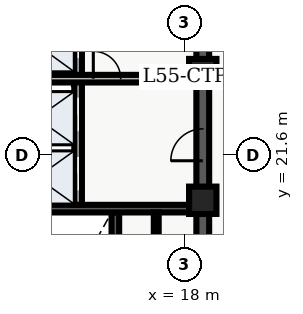
"""IFC4 building model, lengths in metres.
Left out: names, types, materials, properties, quantities, classifications, styles, units other than length and angle.
Written with IfcOpenShell. Run it as: python <this file> out.ifc"""

import sys

from ifc_helpers import new_model, entity, si_unit, converted_unit, direction, frame, origin_with_axes, origin_2d_with_axis, place, context, subcontext, project, spatial, polyline, rectangle, outline, extrude, element, fill, save


model = new_model("IFC4")
c1 = context("Model", 3, precision=1e-05, world=origin_with_axes(), true_north=direction((0.0, 1.0)))
c2 = subcontext(c1, "Body", "Model", "MODEL_VIEW")
j1 = project(units=[si_unit("LENGTHUNIT", "METRE"), converted_unit("PLANEANGLEUNIT", "DEGREE", entity("IfcPlaneAngleMeasure", 0.017), si_unit("PLANEANGLEUNIT", "RADIAN"), dimensions=[0, 0, 0, 0, 0, 0, 0])], contexts=[c1])
p1 = place(None, origin_with_axes())
s1 = spatial("IfcSite", under=j1, at=p1, CompositionType="ELEMENT")
p2 = place(p1, origin_with_axes())
s2 = spatial("IfcBuilding", under=s1, at=p2, CompositionType="ELEMENT")
p3 = place(p2, frame((0.0, 0.0, 224.7), z_axis=(0.0, 0.0, 1.0), x_axis=(1.0, 0.0, 0.0)))
s3 = spatial("IfcBuildingStorey", under=s2, at=p3, CompositionType="ELEMENT", Elevation=224.7)
p4 = place(p3, frame((18.6, 10.8, 0.0), z_axis=(0.0, 0.0, 1.0), x_axis=(0.0, 1.0, 0.0)))
e1 = element("IfcWall", 1, at=p4, inside=s3, PredefinedType="SHEAR", context=c2, shape_type="SweptSolid", body=[
    extrude(outline(polyline([(0.0, -0.21), (13.5, -0.21), (13.5, 0.21), (0.0, 0.21), (0.0, -0.21)])), origin_with_axes(), (0.0, 0.0, 1.0), 3.66),
])
p5 = place(p4, frame((1.3, 0.0, 0.0), z_axis=(0.0, 0.0, 1.0), x_axis=(1.0, 0.0, 0.0)))
e2 = element("IfcOpeningElement", 2, at=p5, cuts=e1, PredefinedType="OPENING", context=c2, shape_type="SweptSolid", body=[
    extrude(rectangle(XDim=1.1, YDim=0.44, at=origin_2d_with_axis()), origin_with_axes(), (0.0, 0.0, 1.0), 2.15),
])
p6 = place(p4, frame((3.4, 0.0, 0.0), z_axis=(0.0, 0.0, 1.0), x_axis=(1.0, 0.0, 0.0)))
e3 = element("IfcOpeningElement", 3, at=p6, cuts=e1, PredefinedType="OPENING", context=c2, shape_type="SweptSolid", body=[
    extrude(rectangle(XDim=1.1, YDim=0.44, at=origin_2d_with_axis()), origin_with_axes(), (0.0, 0.0, 1.0), 2.15),
])
p7 = place(p4, frame((11.125, 0.0, 0.0), z_axis=(0.0, 0.0, 1.0), x_axis=(1.0, 0.0, 0.0)))
e4 = element("IfcOpeningElement", 4, at=p7, cuts=e1, PredefinedType="OPENING", context=c2, shape_type="SweptSolid", body=[
    extrude(rectangle(XDim=1.05, YDim=0.44, at=origin_2d_with_axis()), origin_with_axes(), (0.0, 0.0, 1.0), 2.15),
])
p8 = place(p4, frame((6.675, 0.0, 0.0), z_axis=(0.0, 0.0, 1.0), x_axis=(1.0, 0.0, 0.0)))
e5 = element("IfcOpeningElement", 5, at=p8, cuts=e1, PredefinedType="OPENING", context=c2, shape_type="SweptSolid", body=[
    extrude(rectangle(XDim=0.95, YDim=0.44, at=origin_2d_with_axis()), origin_with_axes(), (0.0, 0.0, 1.0), 2.15),
])
p9 = place(p3, frame((18.6, 24.3, 0.0), z_axis=(0.0, 0.0, 1.0), x_axis=(0.0, 1.0, 0.0)))
e6 = element("IfcWall", 6, at=p9, inside=s3, PredefinedType="SHEAR", context=c2, shape_type="SweptSolid", body=[
    extrude(outline(polyline([(0.0, -0.21), (13.5, -0.21), (13.5, 0.21), (0.0, 0.21), (0.0, -0.21)])), origin_with_axes(), (0.0, 0.0, 1.0), 3.66),
])
p10 = place(p9, frame((6.725, 0.0, 0.0), z_axis=(0.0, 0.0, 1.0), x_axis=(1.0, 0.0, 0.0)))
e7 = element("IfcOpeningElement", 7, at=p10, cuts=e6, PredefinedType="OPENING", context=c2, shape_type="SweptSolid", body=[
    extrude(rectangle(XDim=1.05, YDim=0.44, at=origin_2d_with_axis()), origin_with_axes(), (0.0, 0.0, 1.0), 2.15),
])
p11 = place(p9, frame((11.125, 0.0, 0.0), z_axis=(0.0, 0.0, 1.0), x_axis=(1.0, 0.0, 0.0)))
e8 = element("IfcOpeningElement", 8, at=p11, cuts=e6, PredefinedType="OPENING", context=c2, shape_type="SweptSolid", body=[
    extrude(rectangle(XDim=1.05, YDim=0.44, at=origin_2d_with_axis()), origin_with_axes(), (0.0, 0.0, 1.0), 2.15),
])
p12 = place(p3, frame((15.725, 11.01, 0.0), z_axis=(0.0, 0.0, 1.0), x_axis=(0.0, 1.0, 0.0)))
e9 = element("IfcWall", 9, at=p12, inside=s3, PredefinedType="SHEAR", context=c2, shape_type="SweptSolid", body=[
    extrude(outline(polyline([(0.0, -0.125), (8.69, -0.125), (8.69, 0.125), (0.0, 0.125), (0.0, -0.125)])), origin_with_axes(), (0.0, 0.0, 1.0), 3.66),
])
p13 = place(p3, frame((11.61, 19.825, 0.0), z_axis=(0.0, 0.0, 1.0), x_axis=(1.0, 0.0, 0.0)))
e10 = element("IfcWall", 10, at=p13, inside=s3, PredefinedType="SHEAR", context=c2, shape_type="SweptSolid", body=[
    extrude(outline(polyline([(0.0, -0.125), (6.78, -0.125), (6.78, 0.125), (0.0, 0.125), (0.0, -0.125)])), origin_with_axes(), (0.0, 0.0, 1.0), 3.66),
])
p14 = place(p3, frame((14.5, 19.95, 0.0), z_axis=(0.0, 0.0, 1.0), x_axis=(0.0, 1.0, 0.0)))
e11 = element("IfcWall", 11, at=p14, inside=s3, PredefinedType="SOLIDWALL", context=c2, shape_type="SweptSolid", body=[
    extrude(outline(polyline([(0.0, -0.125), (6.25, -0.125), (6.25, 0.125), (0.0, 0.125), (0.0, -0.125)])), origin_with_axes(), (0.0, 0.0, 1.0), 2.7),
])
p15 = place(p14, frame((1.025, 0.0, 0.0), z_axis=(0.0, 0.0, 1.0), x_axis=(1.0, 0.0, 0.0)))
e12 = element("IfcOpeningElement", 12, at=p15, cuts=e11, PredefinedType="OPENING", context=c2, shape_type="SweptSolid", body=[
    extrude(rectangle(XDim=1.1, YDim=0.27, at=origin_2d_with_axis()), origin_with_axes(), (0.0, 0.0, 1.0), 2.15),
])
p16 = place(p14, frame((2.975, 0.0, 0.0), z_axis=(0.0, 0.0, 1.0), x_axis=(1.0, 0.0, 0.0)))
e13 = element("IfcOpeningElement", 13, at=p16, cuts=e11, PredefinedType="OPENING", context=c2, shape_type="SweptSolid", body=[
    extrude(rectangle(XDim=1.1, YDim=0.27, at=origin_2d_with_axis()), origin_with_axes(), (0.0, 0.0, 1.0), 2.15),
])
p17 = place(p14, frame((5.425, 0.0, 0.0), z_axis=(0.0, 0.0, 1.0), x_axis=(1.0, 0.0, 0.0)))
e14 = element("IfcOpeningElement", 14, at=p17, cuts=e11, PredefinedType="OPENING", context=c2, shape_type="SweptSolid", body=[
    extrude(rectangle(XDim=1.2, YDim=0.27, at=origin_2d_with_axis()), origin_with_axes(), (0.0, 0.0, 1.0), 2.15),
])
p18 = place(p3, frame((11.7, 24.1, 0.0), z_axis=(0.0, 0.0, 1.0), x_axis=(1.0, 0.0, 0.0)))
e15 = element("IfcWall", 15, at=p18, inside=s3, PredefinedType="SOLIDWALL", context=c2, shape_type="SweptSolid", body=[
    extrude(outline(polyline([(0.0, -0.125), (6.6, -0.125), (6.6, 0.125), (0.0, 0.125), (0.0, -0.125)])), origin_with_axes(), (0.0, 0.0, 1.0), 2.7),
])
p19 = place(p18, frame((3.75, 0.0, 0.0), z_axis=(0.0, 0.0, 1.0), x_axis=(1.0, 0.0, 0.0)))
e16 = element("IfcOpeningElement", 16, at=p19, cuts=e15, PredefinedType="OPENING", context=c2, shape_type="SweptSolid", body=[
    extrude(rectangle(XDim=0.9, YDim=0.27, at=origin_2d_with_axis()), origin_with_axes(), (0.0, 0.0, 1.0), 2.15),
])
for number, where, z_axis, x_axis in (
    (17, (18.6, 20.1, 0.0), (0.0, 0.0, 1.0), (1.0, 0.0, 0.0)),
    (18, (18.6, 24.3, 0.0), (0.0, 0.0, 1.0), (1.0, 0.0, 0.0)),
):
    element("IfcColumn", number, at=place(p3, frame(where, z_axis=z_axis, x_axis=x_axis)), inside=s3, PredefinedType="COLUMN", context=c2, shape_type="SweptSolid", body=[
        extrude(rectangle(XDim=0.9, YDim=0.9, at=origin_2d_with_axis()), origin_with_axes(), (0.0, 0.0, 1.0), 3.9),
    ])
p20 = place(p3, frame((17.07, 15.34, 0.0), z_axis=(0.0, 0.0, 1.0), x_axis=(0.0, 1.0, 0.0)))
e19 = element("IfcWall", 19, at=p20, inside=s3, PredefinedType="PARTITIONING", context=c2, shape_type="SweptSolid", body=[
    extrude(outline(polyline([(0.0, -0.08), (4.36, -0.08), (4.36, 0.08), (0.0, 0.08), (0.0, -0.08)])), origin_with_axes(), (0.0, 0.0, 1.0), 2.7),
])
p21 = place(p20, frame((2.05, 0.0, 0.0), z_axis=(0.0, 0.0, 1.0), x_axis=(1.0, 0.0, 0.0)))
e20 = element("IfcOpeningElement", 20, at=p21, cuts=e19, PredefinedType="OPENING", context=c2, shape_type="SweptSolid", body=[
    extrude(rectangle(XDim=0.9, YDim=0.18, at=origin_2d_with_axis()), origin_with_axes(), (0.0, 0.0, 1.0), 2.15),
])
p22 = place(p14, frame((1.025, 0.0, 0.0), z_axis=(0.0, 0.0, 1.0), x_axis=(1.0, 0.0, 0.0)))
e21 = element("IfcDoor", 21, at=p22, inside=s3, OperationType="SLIDING_TO_LEFT", PredefinedType="DOOR", context=c2, shape_type="SweptSolid", body=[
    extrude(rectangle(XDim=1.1, YDim=0.09, at=origin_2d_with_axis()), origin_with_axes(), (0.0, 0.0, 1.0), 2.15),
])
fill(e12, e21)
p23 = place(p14, frame((2.975, 0.0, 0.0), z_axis=(0.0, 0.0, 1.0), x_axis=(1.0, 0.0, 0.0)))
e22 = element("IfcDoor", 22, at=p23, inside=s3, OperationType="SLIDING_TO_RIGHT", PredefinedType="DOOR", context=c2, shape_type="SweptSolid", body=[
    extrude(rectangle(XDim=1.1, YDim=0.09, at=origin_2d_with_axis()), origin_with_axes(), (0.0, 0.0, 1.0), 2.15),
])
fill(e13, e22)
p24 = place(p14, frame((5.425, 0.0, 0.0), z_axis=(0.0, 0.0, 1.0), x_axis=(1.0, 0.0, 0.0)))
e23 = element("IfcDoor", 23, at=p24, inside=s3, OperationType="DOUBLE_DOOR_SLIDING", PredefinedType="DOOR", context=c2, shape_type="SweptSolid", body=[
    extrude(rectangle(XDim=1.2, YDim=0.09, at=origin_2d_with_axis()), origin_with_axes(), (0.0, 0.0, 1.0), 2.15),
])
fill(e14, e23)
p25 = place(p4, frame((11.125, 0.0, 0.0), z_axis=(0.0, 0.0, 1.0), x_axis=(1.0, 0.0, 0.0)))
e24 = element("IfcDoor", 24, at=p25, inside=s3, OperationType="SINGLE_SWING_LEFT", PredefinedType="DOOR", context=c2, shape_type="SweptSolid", body=[
    extrude(rectangle(XDim=1.05, YDim=0.09, at=origin_2d_with_axis()), origin_with_axes(), (0.0, 0.0, 1.0), 2.15),
])
fill(e4, e24)
p26 = place(p18, frame((3.75, 0.0, 0.0), z_axis=(0.0, 0.0, 1.0), x_axis=(1.0, 0.0, 0.0)))
e25 = element("IfcDoor", 25, at=p26, inside=s3, OperationType="SINGLE_SWING_LEFT", PredefinedType="DOOR", context=c2, shape_type="SweptSolid", body=[
    extrude(rectangle(XDim=0.9, YDim=0.09, at=origin_2d_with_axis()), origin_with_axes(), (0.0, 0.0, 1.0), 2.15),
])
fill(e16, e25)
save(model, sys.argv[1])
